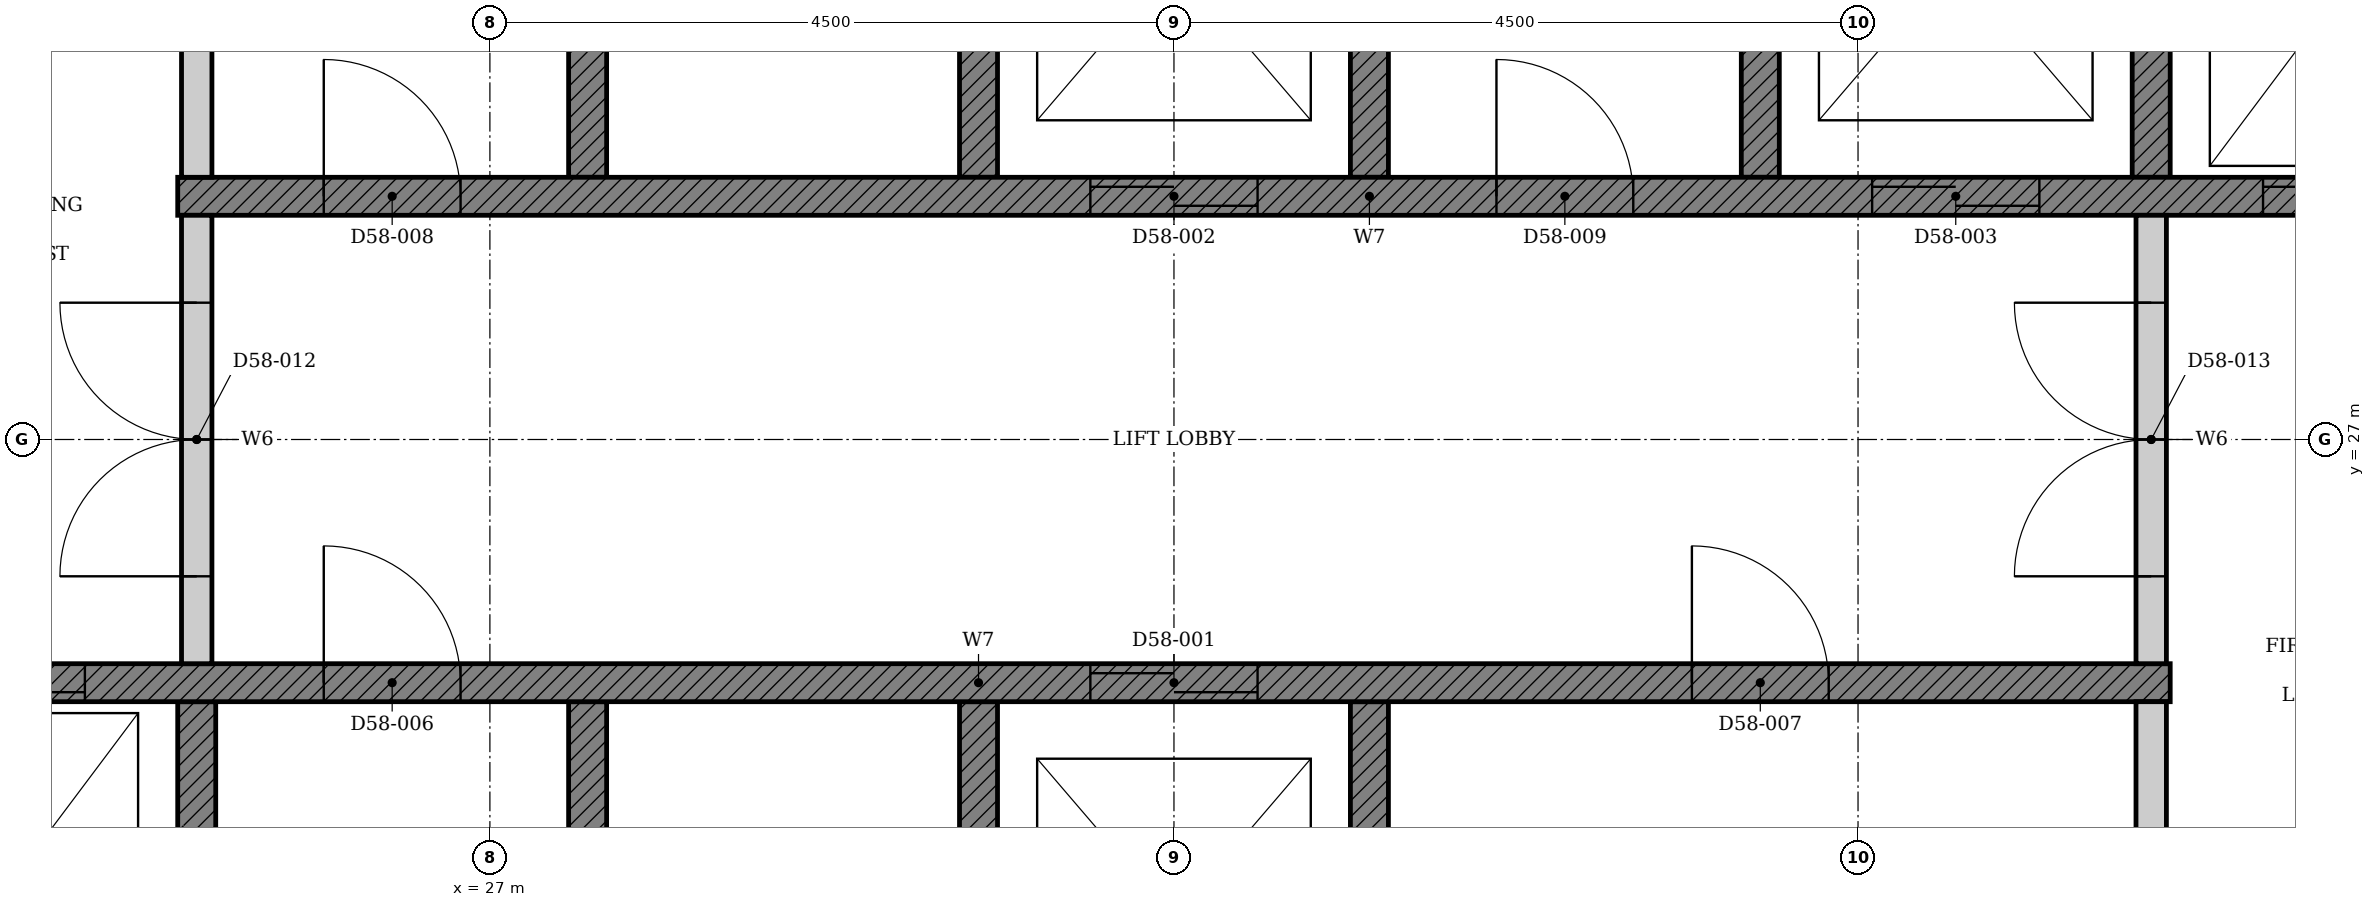
"""IFC4 building model, lengths in metres.
Left out: names, types, materials, properties, quantities, classifications, styles, units other than length and angle.
Written with IfcOpenShell. Run it as: python <this file> out.ifc"""

import sys

from ifc_helpers import new_model, si_unit, direction, frame, frame_2d, origin, place, context, subcontext, project, spatial, polyline, rectangle, outline, extrude, element, fill, save


model = new_model("IFC4")
c1 = context("Model", 3, precision=1e-05, world=origin(), true_north=direction((0.0, 1.0)))
c2 = subcontext(c1, "Body", "Model", "MODEL_VIEW")
j1 = project(units=[si_unit("LENGTHUNIT", "METRE"), si_unit("PLANEANGLEUNIT", "RADIAN")], contexts=[c1])
p1 = place(None, origin())
s1 = spatial("IfcSite", under=j1, at=p1, CompositionType="ELEMENT")
p2 = place(p1, origin())
s2 = spatial("IfcBuilding", under=s1, at=p2, CompositionType="ELEMENT")
p3 = place(p2, frame((0.0, 0.0, 229.4)))
s3 = spatial("IfcBuildingStorey", under=s2, at=p3, CompositionType="ELEMENT", Elevation=229.4)
p4 = place(p3, origin())
e1 = element("IfcWall", 1, at=p4, inside=s3, PredefinedType="SHEAR", context=c2, shape_type="SweptSolid", body=[
    extrude(outline(polyline([(22.375, 22.35), (25.197, 22.35), (25.197, 25.275), (24.947, 25.275), (24.947, 22.65), (22.625, 22.65), (22.625, 25.275), (22.375, 25.275), (22.375, 22.35)])), origin(), (0.0, 0.0, 1.0), 3.3),
])
p5 = place(p3, origin())
e2 = element("IfcWall", 2, at=p5, inside=s3, PredefinedType="SHEAR", context=c2, shape_type="SweptSolid", body=[
    extrude(outline(polyline([(27.518, 22.35), (32.911, 22.35), (32.911, 25.275), (32.661, 25.275), (32.661, 22.65), (30.339, 22.65), (30.339, 25.275), (30.089, 25.275), (30.089, 22.65), (27.768, 22.65), (27.768, 25.275), (27.518, 25.275), (27.518, 22.35)])), origin(), (0.0, 0.0, 1.0), 3.3),
])
p6 = place(p3, origin())
e3 = element("IfcWall", 3, at=p6, inside=s3, PredefinedType="SHEAR", context=c2, shape_type="SweptSolid", body=[
    extrude(outline(polyline([(27.518, 28.725), (27.768, 28.725), (27.768, 31.35), (30.089, 31.35), (30.089, 28.725), (30.339, 28.725), (30.339, 31.35), (32.661, 31.35), (32.661, 28.725), (32.911, 28.725), (32.911, 31.65), (27.518, 31.65), (27.518, 28.725)])), origin(), (0.0, 0.0, 1.0), 3.3),
])
p7 = place(p3, origin())
e4 = element("IfcWall", 4, at=p7, inside=s3, PredefinedType="SHEAR", context=c2, shape_type="SweptSolid", body=[
    extrude(outline(polyline([(35.232, 28.725), (35.482, 28.725), (35.482, 31.35), (37.803, 31.35), (37.803, 28.725), (38.053, 28.725), (38.053, 31.35), (40.375, 31.35), (40.375, 28.725), (40.625, 28.725), (40.625, 31.65), (35.232, 31.65), (35.232, 28.725)])), origin(), (0.0, 0.0, 1.0), 3.3),
])
p8 = place(p3, frame((22.375, 25.4, 0.0), z_axis=(0.0, 0.0, 1.0), x_axis=(1.0, 0.0, 0.0)))
e5 = element("IfcWall", 5, at=p8, inside=s3, PredefinedType="SHEAR", context=c2, shape_type="SweptSolid", body=[
    extrude(rectangle(XDim=15.678, YDim=0.25, at=frame_2d((7.839, 0.0))), origin(), (0.0, 0.0, 1.0), 3.3),
])
p9 = place(p8, frame((8.575, 0.0, 0.0)))
e6 = element("IfcOpeningElement", 6, at=p9, cuts=e5, PredefinedType="OPENING", context=c2, shape_type="SweptSolid", body=[
    extrude(rectangle(XDim=1.1, YDim=2.1, at=frame_2d((0.55, 1.05))), frame((0.0, 0.135, 0.0), z_axis=(0.0, -1.0, 0.0), x_axis=(1.0, 0.0, 0.0)), (0.0, 0.0, 1.0), 0.27),
])
p10 = place(p8, frame((0.861, 0.0, 0.0)))
e7 = element("IfcOpeningElement", 7, at=p10, cuts=e5, PredefinedType="OPENING", context=c2, shape_type="SweptSolid", body=[
    extrude(rectangle(XDim=1.1, YDim=2.1, at=frame_2d((0.55, 1.05))), frame((0.0, 0.135, 0.0), z_axis=(0.0, -1.0, 0.0), x_axis=(1.0, 0.0, 0.0)), (0.0, 0.0, 1.0), 0.27),
])
p11 = place(p8, frame((3.532, 0.0, 0.0)))
e8 = element("IfcOpeningElement", 8, at=p11, cuts=e5, PredefinedType="OPENING", context=c2, shape_type="SweptSolid", body=[
    extrude(rectangle(XDim=0.9, YDim=2.1, at=frame_2d((0.45, 1.05))), frame((0.0, 0.135, 0.0), z_axis=(0.0, -1.0, 0.0), x_axis=(1.0, 0.0, 0.0)), (0.0, 0.0, 1.0), 0.27),
])
p12 = place(p8, frame((12.532, 0.0, 0.0)))
e9 = element("IfcOpeningElement", 9, at=p12, cuts=e5, PredefinedType="OPENING", context=c2, shape_type="SweptSolid", body=[
    extrude(rectangle(XDim=0.9, YDim=2.1, at=frame_2d((0.45, 1.05))), frame((0.0, 0.135, 0.0), z_axis=(0.0, -1.0, 0.0), x_axis=(1.0, 0.0, 0.0)), (0.0, 0.0, 1.0), 0.27),
])
p13 = place(p3, frame((24.947, 28.6, 0.0), z_axis=(0.0, 0.0, 1.0), x_axis=(1.0, 0.0, 0.0)))
e10 = element("IfcWall", 10, at=p13, inside=s3, PredefinedType="SHEAR", context=c2, shape_type="SweptSolid", body=[
    extrude(rectangle(XDim=15.678, YDim=0.25, at=frame_2d((7.839, 0.0))), origin(), (0.0, 0.0, 1.0), 3.3),
])
p14 = place(p13, frame((6.004, 0.0, 0.0)))
e11 = element("IfcOpeningElement", 11, at=p14, cuts=e10, PredefinedType="OPENING", context=c2, shape_type="SweptSolid", body=[
    extrude(rectangle(XDim=1.1, YDim=2.1, at=frame_2d((0.55, 1.05))), frame((0.0, 0.135, 0.0), z_axis=(0.0, -1.0, 0.0), x_axis=(1.0, 0.0, 0.0)), (0.0, 0.0, 1.0), 0.27),
])
p15 = place(p13, frame((11.146, 0.0, 0.0)))
e12 = element("IfcOpeningElement", 12, at=p15, cuts=e10, PredefinedType="OPENING", context=c2, shape_type="SweptSolid", body=[
    extrude(rectangle(XDim=1.1, YDim=2.1, at=frame_2d((0.55, 1.05))), frame((0.0, 0.135, 0.0), z_axis=(0.0, -1.0, 0.0), x_axis=(1.0, 0.0, 0.0)), (0.0, 0.0, 1.0), 0.27),
])
p16 = place(p13, frame((13.718, 0.0, 0.0)))
e13 = element("IfcOpeningElement", 13, at=p16, cuts=e10, PredefinedType="OPENING", context=c2, shape_type="SweptSolid", body=[
    extrude(rectangle(XDim=1.1, YDim=2.1, at=frame_2d((0.55, 1.05))), frame((0.0, 0.135, 0.0), z_axis=(0.0, -1.0, 0.0), x_axis=(1.0, 0.0, 0.0)), (0.0, 0.0, 1.0), 0.27),
])
p17 = place(p13, frame((0.961, 0.0, 0.0)))
e14 = element("IfcOpeningElement", 14, at=p17, cuts=e10, PredefinedType="OPENING", context=c2, shape_type="SweptSolid", body=[
    extrude(rectangle(XDim=0.9, YDim=2.1, at=frame_2d((0.45, 1.05))), frame((0.0, 0.135, 0.0), z_axis=(0.0, -1.0, 0.0), x_axis=(1.0, 0.0, 0.0)), (0.0, 0.0, 1.0), 0.27),
])
p18 = place(p13, frame((8.675, 0.0, 0.0)))
e15 = element("IfcOpeningElement", 15, at=p18, cuts=e10, PredefinedType="OPENING", context=c2, shape_type="SweptSolid", body=[
    extrude(rectangle(XDim=0.9, YDim=2.1, at=frame_2d((0.45, 1.05))), frame((0.0, 0.135, 0.0), z_axis=(0.0, -1.0, 0.0), x_axis=(1.0, 0.0, 0.0)), (0.0, 0.0, 1.0), 0.27),
])
for number, where, z_axis, x_axis in (
    (16, (37.928, 22.65, 0.0), (0.0, 0.0, 1.0), (0.0, 1.0, 0.0)),
    (17, (25.072, 28.725, 0.0), (0.0, 0.0, 1.0), (0.0, 1.0, 0.0)),
):
    element("IfcWall", number, at=place(p3, frame(where, z_axis=z_axis, x_axis=x_axis)), inside=s3, PredefinedType="PARTITIONING", context=c2, shape_type="SweptSolid", body=[
        extrude(rectangle(XDim=2.625, YDim=0.2, at=frame_2d((1.312, 0.0))), origin(), (0.0, 0.0, 1.0), 3.3),
    ])
p19 = place(p3, frame((25.072, 25.525, 0.0), z_axis=(0.0, 0.0, 1.0), x_axis=(0.0, 1.0, 0.0)))
e18 = element("IfcWall", 18, at=p19, inside=s3, PredefinedType="PARTITIONING", context=c2, shape_type="SweptSolid", body=[
    extrude(rectangle(XDim=2.95, YDim=0.2, at=frame_2d((1.475, 0.0))), origin(), (0.0, 0.0, 1.0), 3.3),
])
p20 = place(p19, frame((0.575, 0.0, 0.0)))
e19 = element("IfcOpeningElement", 19, at=p20, cuts=e18, PredefinedType="OPENING", context=c2, shape_type="SweptSolid", body=[
    extrude(rectangle(XDim=1.8, YDim=2.1, at=frame_2d((0.9, 1.05))), frame((0.0, 0.11, 0.0), z_axis=(0.0, -1.0, 0.0), x_axis=(1.0, 0.0, 0.0)), (0.0, 0.0, 1.0), 0.22),
])
p21 = place(p3, frame((37.928, 25.525, 0.0), z_axis=(0.0, 0.0, 1.0), x_axis=(0.0, 1.0, 0.0)))
e20 = element("IfcWall", 20, at=p21, inside=s3, PredefinedType="PARTITIONING", context=c2, shape_type="SweptSolid", body=[
    extrude(rectangle(XDim=2.95, YDim=0.2, at=frame_2d((1.475, 0.0))), origin(), (0.0, 0.0, 1.0), 3.3),
])
p22 = place(p21, frame((0.575, 0.0, 0.0)))
e21 = element("IfcOpeningElement", 21, at=p22, cuts=e20, PredefinedType="OPENING", context=c2, shape_type="SweptSolid", body=[
    extrude(rectangle(XDim=1.8, YDim=2.1, at=frame_2d((0.9, 1.05))), frame((0.0, 0.11, 0.0), z_axis=(0.0, -1.0, 0.0), x_axis=(1.0, 0.0, 0.0)), (0.0, 0.0, 1.0), 0.22),
])
p23 = place(p9, origin())
e22 = element("IfcDoor", 22, at=p23, inside=s3, OperationType="DOUBLE_DOOR_SLIDING", PredefinedType="DOOR", context=c2, shape_type="SweptSolid", body=[
    extrude(rectangle(XDim=1.1, YDim=2.1, at=frame_2d((0.55, 1.05))), frame((0.0, 0.025, 0.0), z_axis=(0.0, -1.0, 0.0), x_axis=(1.0, 0.0, 0.0)), (0.0, 0.0, 1.0), 0.05),
])
fill(e6, e22)
p24 = place(p14, origin())
e23 = element("IfcDoor", 23, at=p24, inside=s3, OperationType="DOUBLE_DOOR_SLIDING", PredefinedType="DOOR", context=c2, shape_type="SweptSolid", body=[
    extrude(rectangle(XDim=1.1, YDim=2.1, at=frame_2d((0.55, 1.05))), frame((0.0, 0.025, 0.0), z_axis=(0.0, -1.0, 0.0), x_axis=(1.0, 0.0, 0.0)), (0.0, 0.0, 1.0), 0.05),
])
fill(e11, e23)
p25 = place(p15, origin())
e24 = element("IfcDoor", 24, at=p25, inside=s3, OperationType="DOUBLE_DOOR_SLIDING", PredefinedType="DOOR", context=c2, shape_type="SweptSolid", body=[
    extrude(rectangle(XDim=1.1, YDim=2.1, at=frame_2d((0.55, 1.05))), frame((0.0, 0.025, 0.0), z_axis=(0.0, -1.0, 0.0), x_axis=(1.0, 0.0, 0.0)), (0.0, 0.0, 1.0), 0.05),
])
fill(e12, e24)
p26 = place(p10, origin())
e25 = element("IfcDoor", 25, at=p26, inside=s3, OperationType="DOUBLE_DOOR_SLIDING", PredefinedType="DOOR", context=c2, shape_type="SweptSolid", body=[
    extrude(rectangle(XDim=1.1, YDim=2.1, at=frame_2d((0.55, 1.05))), frame((0.0, 0.025, 0.0), z_axis=(0.0, -1.0, 0.0), x_axis=(1.0, 0.0, 0.0)), (0.0, 0.0, 1.0), 0.05),
])
fill(e7, e25)
p27 = place(p16, origin())
e26 = element("IfcDoor", 26, at=p27, inside=s3, OperationType="DOUBLE_DOOR_SLIDING", PredefinedType="DOOR", context=c2, shape_type="SweptSolid", body=[
    extrude(rectangle(XDim=1.1, YDim=2.1, at=frame_2d((0.55, 1.05))), frame((0.0, 0.025, 0.0), z_axis=(0.0, -1.0, 0.0), x_axis=(1.0, 0.0, 0.0)), (0.0, 0.0, 1.0), 0.05),
])
fill(e13, e26)
p28 = place(p11, origin())
e27 = element("IfcDoor", 27, at=p28, inside=s3, OperationType="SINGLE_SWING_LEFT", PredefinedType="DOOR", context=c2, shape_type="SweptSolid", body=[
    extrude(rectangle(XDim=0.9, YDim=2.1, at=frame_2d((0.45, 1.05))), frame((0.0, 0.025, 0.0), z_axis=(0.0, -1.0, 0.0), x_axis=(1.0, 0.0, 0.0)), (0.0, 0.0, 1.0), 0.05),
])
fill(e8, e27)
p29 = place(p12, origin())
e28 = element("IfcDoor", 28, at=p29, inside=s3, OperationType="SINGLE_SWING_LEFT", PredefinedType="DOOR", context=c2, shape_type="SweptSolid", body=[
    extrude(rectangle(XDim=0.9, YDim=2.1, at=frame_2d((0.45, 1.05))), frame((0.0, 0.025, 0.0), z_axis=(0.0, -1.0, 0.0), x_axis=(1.0, 0.0, 0.0)), (0.0, 0.0, 1.0), 0.05),
])
fill(e9, e28)
p30 = place(p17, origin())
e29 = element("IfcDoor", 29, at=p30, inside=s3, OperationType="SINGLE_SWING_LEFT", PredefinedType="DOOR", context=c2, shape_type="SweptSolid", body=[
    extrude(rectangle(XDim=0.9, YDim=2.1, at=frame_2d((0.45, 1.05))), frame((0.0, 0.025, 0.0), z_axis=(0.0, -1.0, 0.0), x_axis=(1.0, 0.0, 0.0)), (0.0, 0.0, 1.0), 0.05),
])
fill(e14, e29)
p31 = place(p18, origin())
e30 = element("IfcDoor", 30, at=p31, inside=s3, OperationType="SINGLE_SWING_LEFT", PredefinedType="DOOR", context=c2, shape_type="SweptSolid", body=[
    extrude(rectangle(XDim=0.9, YDim=2.1, at=frame_2d((0.45, 1.05))), frame((0.0, 0.025, 0.0), z_axis=(0.0, -1.0, 0.0), x_axis=(1.0, 0.0, 0.0)), (0.0, 0.0, 1.0), 0.05),
])
fill(e15, e30)
p32 = place(p20, origin())
e31 = element("IfcDoor", 31, at=p32, inside=s3, OperationType="DOUBLE_DOOR_SINGLE_SWING", PredefinedType="DOOR", context=c2, shape_type="SweptSolid", body=[
    extrude(rectangle(XDim=1.8, YDim=2.1, at=frame_2d((0.9, 1.05))), frame((0.0, 0.025, 0.0), z_axis=(0.0, -1.0, 0.0), x_axis=(1.0, 0.0, 0.0)), (0.0, 0.0, 1.0), 0.05),
])
fill(e19, e31)
p33 = place(p22, origin())
e32 = element("IfcDoor", 32, at=p33, inside=s3, OperationType="DOUBLE_DOOR_SINGLE_SWING", PredefinedType="DOOR", context=c2, shape_type="SweptSolid", body=[
    extrude(rectangle(XDim=1.8, YDim=2.1, at=frame_2d((0.9, 1.05))), frame((0.0, 0.025, 0.0), z_axis=(0.0, -1.0, 0.0), x_axis=(1.0, 0.0, 0.0)), (0.0, 0.0, 1.0), 0.05),
])
fill(e21, e32)
save(model, sys.argv[1])
